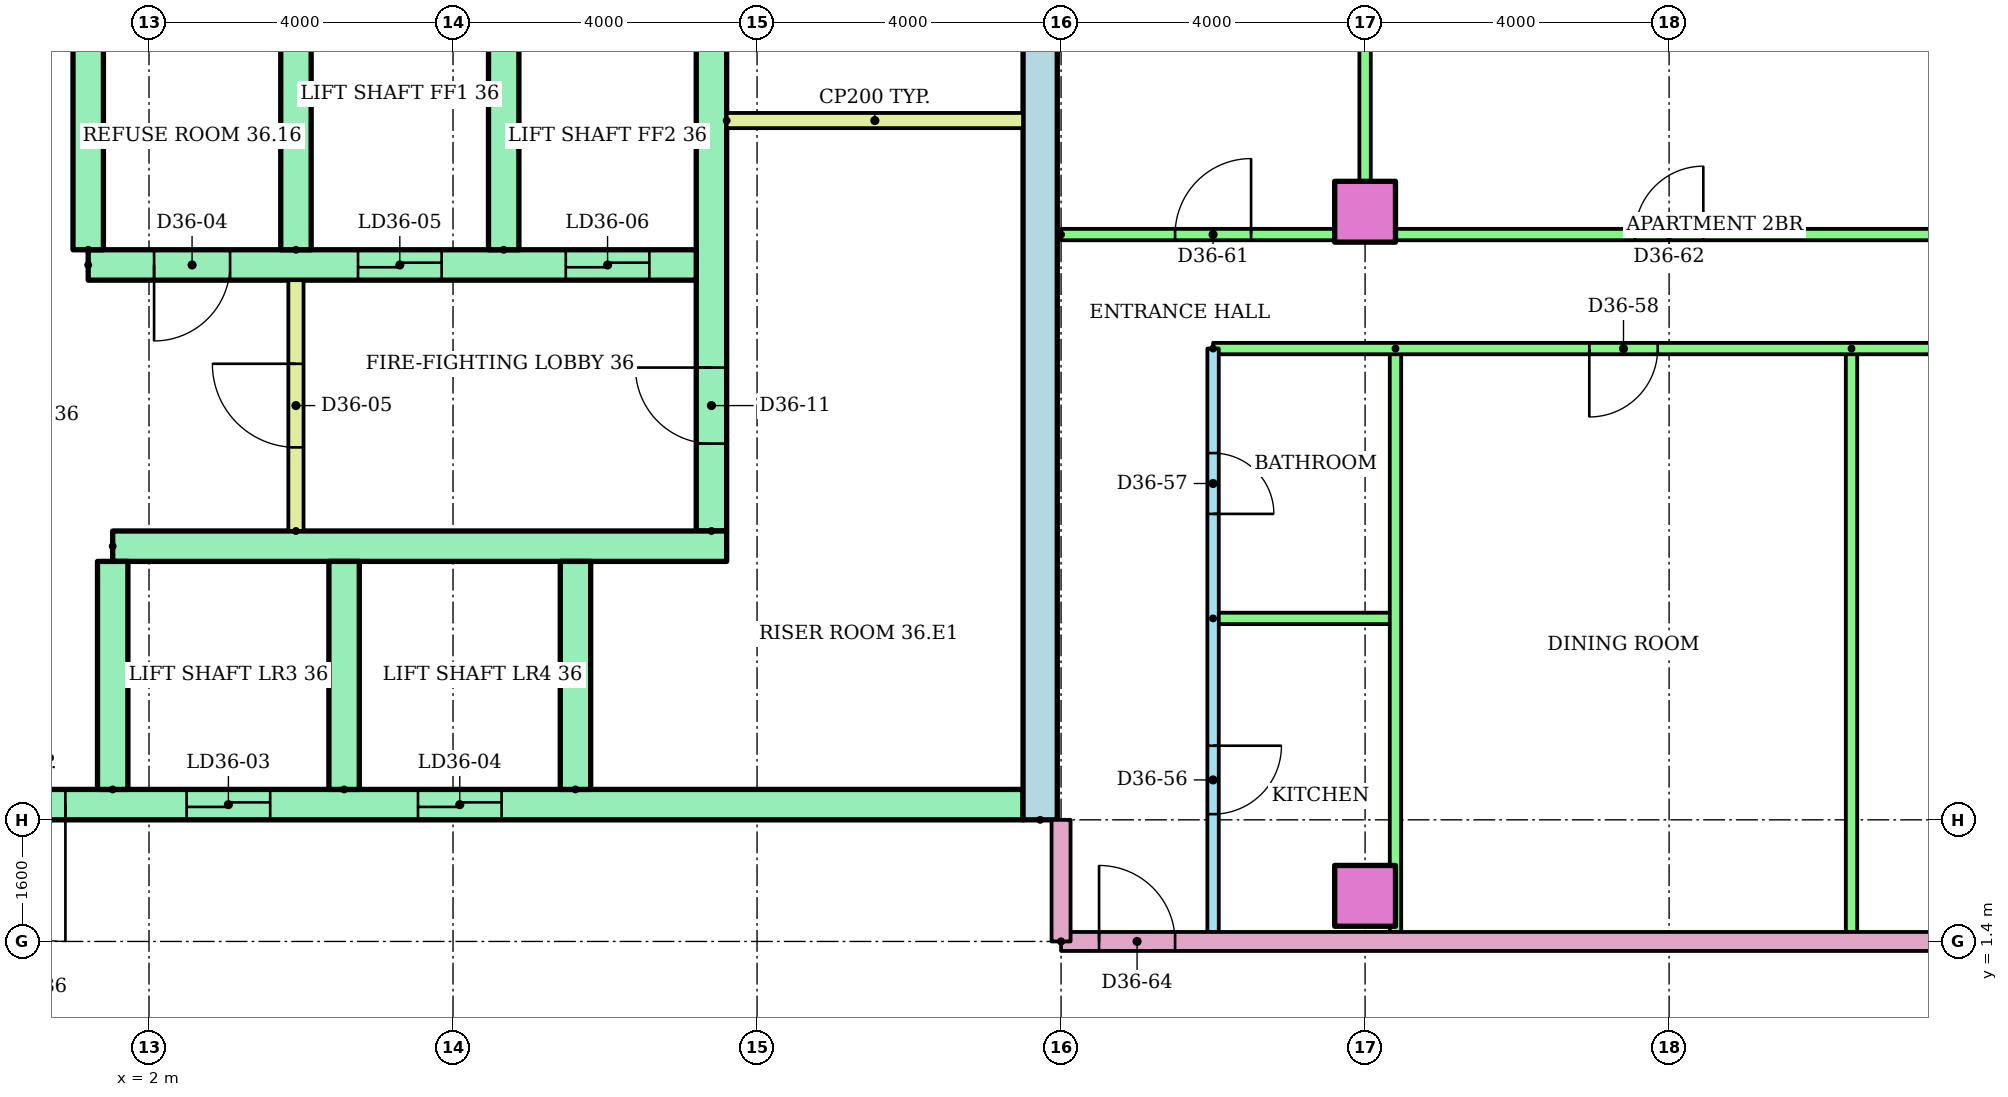
"""IFC4 building model, lengths in metres.
Left out: names, types, materials, properties, quantities, classifications, styles, units other than length and angle.
Written with IfcOpenShell. Run it as: python <this file> out.ifc"""

import sys

from ifc_helpers import new_model, si_unit, direction, frame, frame_2d, origin, origin_2d, place, context, subcontext, project, spatial, rectangle, extrude, element, fill, save


model = new_model("IFC4")
c1 = context("Model", 3, precision=1e-05, world=origin(), true_north=direction((0.0, 1.0)))
c2 = subcontext(c1, "Body", "Model", "MODEL_VIEW")
j1 = project(units=[si_unit("LENGTHUNIT", "METRE"), si_unit("PLANEANGLEUNIT", "RADIAN")], contexts=[c1])
p1 = place(None, origin())
s1 = spatial("IfcSite", under=j1, at=p1, CompositionType="ELEMENT")
p2 = place(p1, origin())
s2 = spatial("IfcBuilding", under=s1, at=p2, CompositionType="ELEMENT")
p3 = place(p2, frame((0.0, 0.0, 139.0)))
s3 = spatial("IfcBuildingStorey", under=s2, at=p3, CompositionType="ELEMENT", Elevation=139.0)
for number, where in (
    (1, (18.0, 2.0, 0.0)),
    (2, (18.0, 11.0, 0.0)),
):
    element("IfcColumn", number, at=place(p3, frame(where)), inside=s3, PredefinedType="COLUMN", context=c2, shape_type="SweptSolid", body=[
        extrude(rectangle(XDim=0.8, YDim=0.8, at=origin_2d()), origin(), (0.0, 0.0, 1.0), 3.2),
    ])
p4 = place(p3, frame((13.725, 3.0, 0.0), z_axis=(0.0, 0.0, 1.0), x_axis=(0.0, 1.0, 0.0)))
e3 = element("IfcWall", 3, at=p4, inside=s3, PredefinedType="SHEAR", context=c2, shape_type="SweptSolid", body=[
    extrude(rectangle(XDim=17.0, YDim=0.45, at=frame_2d((8.5, 0.0))), origin(), (0.0, 0.0, 1.0), 2.92),
])
p5 = place(p3, frame((9.4, 6.8, 0.0), z_axis=(0.0, 0.0, 1.0), x_axis=(0.0, 1.0, 0.0)))
e4 = element("IfcWall", 4, at=p5, inside=s3, PredefinedType="SHEAR", context=c2, shape_type="SweptSolid", body=[
    extrude(rectangle(XDim=12.7, YDim=0.4, at=frame_2d((6.35, 0.0))), origin(), (0.0, 0.0, 1.0), 2.92),
])
p6 = place(p5, frame((1.15, 0.0, 0.0)))
e5 = element("IfcOpeningElement", 5, at=p6, cuts=e4, PredefinedType="OPENING", context=c2, shape_type="SweptSolid", body=[
    extrude(rectangle(XDim=1.0, YDim=2.1, at=frame_2d((0.5, 1.05))), frame((0.0, 0.21, 0.0), z_axis=(0.0, -1.0, 0.0), x_axis=(1.0, 0.0, 0.0)), (0.0, 0.0, 1.0), 0.42),
])
p7 = place(p5, frame((7.925, 0.0, 0.0)))
e6 = element("IfcOpeningElement", 6, at=p7, cuts=e4, PredefinedType="OPENING", context=c2, shape_type="SweptSolid", body=[
    extrude(rectangle(XDim=1.0, YDim=2.1, at=frame_2d((0.5, 1.05))), frame((0.0, 0.21, 0.0), z_axis=(0.0, -1.0, 0.0), x_axis=(1.0, 0.0, 0.0)), (0.0, 0.0, 1.0), 0.42),
])
p8 = place(p3, frame((-13.5, 3.2, 0.0)))
e7 = element("IfcWall", 7, at=p8, inside=s3, PredefinedType="SHEAR", context=c2, shape_type="SweptSolid", body=[
    extrude(rectangle(XDim=27.0, YDim=0.4, at=frame_2d((13.5, 0.0))), origin(), (0.0, 0.0, 1.0), 2.92),
])
p9 = place(p8, frame((6.861, 0.0, 0.0)))
e8 = element("IfcOpeningElement", 8, at=p9, cuts=e7, PredefinedType="OPENING", context=c2, shape_type="SweptSolid", body=[
    extrude(rectangle(XDim=1.1, YDim=2.1, at=frame_2d((0.55, 1.05))), frame((0.0, 0.21, 0.0), z_axis=(0.0, -1.0, 0.0), x_axis=(1.0, 0.0, 0.0)), (0.0, 0.0, 1.0), 0.42),
])
p10 = place(p8, frame((9.906, 0.0, 0.0)))
e9 = element("IfcOpeningElement", 9, at=p10, cuts=e7, PredefinedType="OPENING", context=c2, shape_type="SweptSolid", body=[
    extrude(rectangle(XDim=1.1, YDim=2.1, at=frame_2d((0.55, 1.05))), frame((0.0, 0.21, 0.0), z_axis=(0.0, -1.0, 0.0), x_axis=(1.0, 0.0, 0.0)), (0.0, 0.0, 1.0), 0.42),
])
p11 = place(p8, frame((15.994, 0.0, 0.0)))
e10 = element("IfcOpeningElement", 10, at=p11, cuts=e7, PredefinedType="OPENING", context=c2, shape_type="SweptSolid", body=[
    extrude(rectangle(XDim=1.1, YDim=2.1, at=frame_2d((0.55, 1.05))), frame((0.0, 0.21, 0.0), z_axis=(0.0, -1.0, 0.0), x_axis=(1.0, 0.0, 0.0)), (0.0, 0.0, 1.0), 0.42),
])
p12 = place(p8, frame((19.039, 0.0, 0.0)))
e11 = element("IfcOpeningElement", 11, at=p12, cuts=e7, PredefinedType="OPENING", context=c2, shape_type="SweptSolid", body=[
    extrude(rectangle(XDim=1.1, YDim=2.1, at=frame_2d((0.55, 1.05))), frame((0.0, 0.21, 0.0), z_axis=(0.0, -1.0, 0.0), x_axis=(1.0, 0.0, 0.0)), (0.0, 0.0, 1.0), 0.42),
])
p13 = place(p8, frame((12.6, 0.0, 0.0)))
e12 = element("IfcOpeningElement", 12, at=p13, cuts=e7, PredefinedType="OPENING", context=c2, shape_type="SweptSolid", body=[
    extrude(rectangle(XDim=1.8, YDim=2.1, at=frame_2d((0.9, 1.05))), frame((0.0, 0.21, 0.0), z_axis=(0.0, -1.0, 0.0), x_axis=(1.0, 0.0, 0.0)), (0.0, 0.0, 1.0), 0.42),
])
p14 = place(p3, frame((1.522, 6.6, 0.0)))
e13 = element("IfcWall", 13, at=p14, inside=s3, PredefinedType="SHEAR", context=c2, shape_type="SweptSolid", body=[
    extrude(rectangle(XDim=8.078, YDim=0.4, at=frame_2d((4.039, 0.0))), origin(), (0.0, 0.0, 1.0), 2.92),
])
for number, where, z_axis, x_axis in (
    (14, (1.522, 3.4, 0.0), (0.0, 0.0, 1.0), (0.0, 1.0, 0.0)),
    (15, (4.567, 3.4, 0.0), (0.0, 0.0, 1.0), (0.0, 1.0, 0.0)),
    (16, (7.611, 3.4, 0.0), (0.0, 0.0, 1.0), (0.0, 1.0, 0.0)),
):
    element("IfcWall", number, at=place(p3, frame(where, z_axis=z_axis, x_axis=x_axis)), inside=s3, PredefinedType="SHEAR", context=c2, shape_type="SweptSolid", body=[
        extrude(rectangle(XDim=3.0, YDim=0.4, at=frame_2d((1.5, 0.0))), origin(), (0.0, 0.0, 1.0), 2.92),
    ])
p15 = place(p3, frame((1.2, 10.3, 0.0)))
e17 = element("IfcWall", 17, at=p15, inside=s3, PredefinedType="SHEAR", context=c2, shape_type="SweptSolid", body=[
    extrude(rectangle(XDim=8.0, YDim=0.4, at=frame_2d((4.0, 0.0))), origin(), (0.0, 0.0, 1.0), 2.92),
])
p16 = place(p15, frame((3.55, 0.0, 0.0)))
e18 = element("IfcOpeningElement", 18, at=p16, cuts=e17, PredefinedType="OPENING", context=c2, shape_type="SweptSolid", body=[
    extrude(rectangle(XDim=1.1, YDim=2.1, at=frame_2d((0.55, 1.05))), frame((0.0, 0.21, 0.0), z_axis=(0.0, -1.0, 0.0), x_axis=(1.0, 0.0, 0.0)), (0.0, 0.0, 1.0), 0.42),
])
p17 = place(p15, frame((6.283, 0.0, 0.0)))
e19 = element("IfcOpeningElement", 19, at=p17, cuts=e17, PredefinedType="OPENING", context=c2, shape_type="SweptSolid", body=[
    extrude(rectangle(XDim=1.1, YDim=2.1, at=frame_2d((0.55, 1.05))), frame((0.0, 0.21, 0.0), z_axis=(0.0, -1.0, 0.0), x_axis=(1.0, 0.0, 0.0)), (0.0, 0.0, 1.0), 0.42),
])
p18 = place(p15, frame((0.867, 0.0, 0.0)))
e20 = element("IfcOpeningElement", 20, at=p18, cuts=e17, PredefinedType="OPENING", context=c2, shape_type="SweptSolid", body=[
    extrude(rectangle(XDim=1.0, YDim=2.1, at=frame_2d((0.5, 1.05))), frame((0.0, 0.21, 0.0), z_axis=(0.0, -1.0, 0.0), x_axis=(1.0, 0.0, 0.0)), (0.0, 0.0, 1.0), 0.42),
])
for number, where, z_axis, x_axis in (
    (21, (1.2, 10.5, 0.0), (0.0, 0.0, 1.0), (0.0, 1.0, 0.0)),
    (22, (3.933, 10.5, 0.0), (0.0, 0.0, 1.0), (0.0, 1.0, 0.0)),
    (23, (6.667, 10.5, 0.0), (0.0, 0.0, 1.0), (0.0, 1.0, 0.0)),
):
    element("IfcWall", number, at=place(p3, frame(where, z_axis=z_axis, x_axis=x_axis)), inside=s3, PredefinedType="SHEAR", context=c2, shape_type="SweptSolid", body=[
        extrude(rectangle(XDim=3.0, YDim=0.4, at=frame_2d((1.5, 0.0))), origin(), (0.0, 0.0, 1.0), 2.92),
    ])
p19 = place(p3, frame((3.933, 6.8, 0.0), z_axis=(0.0, 0.0, 1.0), x_axis=(0.0, 1.0, 0.0)))
e24 = element("IfcWall", 24, at=p19, inside=s3, PredefinedType="PARTITIONING", context=c2, shape_type="SweptSolid", body=[
    extrude(rectangle(XDim=3.3, YDim=0.2, at=frame_2d((1.65, 0.0))), origin(), (0.0, 0.0, 1.0), 2.92),
])
p20 = place(p19, frame((1.1, 0.0, 0.0)))
e25 = element("IfcOpeningElement", 25, at=p20, cuts=e24, PredefinedType="OPENING", context=c2, shape_type="SweptSolid", body=[
    extrude(rectangle(XDim=1.1, YDim=2.1, at=frame_2d((0.55, 1.05))), frame((0.0, 0.11, 0.0), z_axis=(0.0, -1.0, 0.0), x_axis=(1.0, 0.0, 0.0)), (0.0, 0.0, 1.0), 0.22),
])
p21 = place(p3, frame((9.6, 12.2, 0.0)))
e26 = element("IfcWall", 26, at=p21, inside=s3, PredefinedType="PARTITIONING", context=c2, shape_type="SweptSolid", body=[
    extrude(rectangle(XDim=3.9, YDim=0.2, at=frame_2d((1.95, 0.0))), origin(), (0.0, 0.0, 1.0), 2.92),
])
p22 = place(p3, frame((16.0, 9.2, 0.0), z_axis=(0.0, 0.0, 1.0), x_axis=(0.0, -1.0, 0.0)))
e27 = element("IfcWall", 27, at=p22, inside=s3, PredefinedType="PARTITIONING", context=c2, shape_type="SweptSolid", body=[
    extrude(rectangle(XDim=7.8, YDim=0.15, at=frame_2d((3.9, 0.0))), origin(), (0.0, 0.0, 1.0), 2.4),
])
p23 = place(p22, frame((5.225, 0.0, 0.0)))
e28 = element("IfcOpeningElement", 28, at=p23, cuts=e27, PredefinedType="OPENING", context=c2, shape_type="SweptSolid", body=[
    extrude(rectangle(XDim=0.9, YDim=2.1, at=frame_2d((0.45, 1.05))), frame((0.0, 0.085, 0.0), z_axis=(0.0, -1.0, 0.0), x_axis=(1.0, 0.0, 0.0)), (0.0, 0.0, 1.0), 0.17),
])
p24 = place(p22, frame((1.375, 0.0, 0.0)))
e29 = element("IfcOpeningElement", 29, at=p24, cuts=e27, PredefinedType="OPENING", context=c2, shape_type="SweptSolid", body=[
    extrude(rectangle(XDim=0.8, YDim=2.1, at=frame_2d((0.4, 1.05))), frame((0.0, 0.085, 0.0), z_axis=(0.0, -1.0, 0.0), x_axis=(1.0, 0.0, 0.0)), (0.0, 0.0, 1.0), 0.17),
])
p25 = place(p3, frame((16.0, 5.65, 0.0)))
e30 = element("IfcWall", 30, at=p25, inside=s3, PredefinedType="PARTITIONING", context=c2, shape_type="SweptSolid", body=[
    extrude(rectangle(XDim=2.4, YDim=0.15, at=frame_2d((1.2, 0.0))), origin(), (0.0, 0.0, 1.0), 2.4),
])
for number, where, z_axis, x_axis in (
    (31, (18.4, 9.2, 0.0), (0.0, 0.0, 1.0), (0.0, -1.0, 0.0)),
    (32, (24.4, 9.2, 0.0), (0.0, 0.0, 1.0), (0.0, -1.0, 0.0)),
):
    element("IfcWall", number, at=place(p3, frame(where, z_axis=z_axis, x_axis=x_axis)), inside=s3, PredefinedType="PARTITIONING", context=c2, shape_type="SweptSolid", body=[
        extrude(rectangle(XDim=7.8, YDim=0.15, at=frame_2d((3.9, 0.0))), origin(), (0.0, 0.0, 1.0), 2.4),
    ])
p26 = place(p3, frame((32.71, 9.2, 0.0), z_axis=(0.0, 0.0, 1.0), x_axis=(-1.0, 0.0, 0.0)))
e33 = element("IfcWall", 33, at=p26, inside=s3, PredefinedType="PARTITIONING", context=c2, shape_type="SweptSolid", body=[
    extrude(rectangle(XDim=16.71, YDim=0.15, at=frame_2d((8.355, 0.0))), origin(), (0.0, 0.0, 1.0), 2.4),
])
p27 = place(p26, frame((10.86, 0.0, 0.0)))
e34 = element("IfcOpeningElement", 34, at=p27, cuts=e33, PredefinedType="OPENING", context=c2, shape_type="SweptSolid", body=[
    extrude(rectangle(XDim=0.9, YDim=2.1, at=frame_2d((0.45, 1.05))), frame((0.0, 0.085, 0.0), z_axis=(0.0, -1.0, 0.0), x_axis=(1.0, 0.0, 0.0)), (0.0, 0.0, 1.0), 0.17),
])
p28 = place(p26, frame((5.192, 0.0, 0.0)))
e35 = element("IfcOpeningElement", 35, at=p28, cuts=e33, PredefinedType="OPENING", context=c2, shape_type="SweptSolid", body=[
    extrude(rectangle(XDim=0.9, YDim=2.1, at=frame_2d((0.45, 1.05))), frame((0.0, 0.085, 0.0), z_axis=(0.0, -1.0, 0.0), x_axis=(1.0, 0.0, 0.0)), (0.0, 0.0, 1.0), 0.17),
])
p29 = place(p26, frame((1.435, 0.0, 0.0)))
e36 = element("IfcOpeningElement", 36, at=p29, cuts=e33, PredefinedType="OPENING", context=c2, shape_type="SweptSolid", body=[
    extrude(rectangle(XDim=0.9, YDim=2.1, at=frame_2d((0.45, 1.05))), frame((0.0, 0.085, 0.0), z_axis=(0.0, -1.0, 0.0), x_axis=(1.0, 0.0, 0.0)), (0.0, 0.0, 1.0), 0.17),
])
p30 = place(p3, frame((14.0, 10.7, 0.0)))
e37 = element("IfcWall", 37, at=p30, inside=s3, PredefinedType="PARTITIONING", context=c2, shape_type="SweptSolid", body=[
    extrude(rectangle(XDim=18.71, YDim=0.15, at=frame_2d((9.355, 0.0))), origin(), (0.0, 0.0, 1.0), 2.4),
])
p31 = place(p30, frame((1.5, 0.0, 0.0)))
e38 = element("IfcOpeningElement", 38, at=p31, cuts=e37, PredefinedType="OPENING", context=c2, shape_type="SweptSolid", body=[
    extrude(rectangle(XDim=1.0, YDim=2.1, at=frame_2d((0.5, 1.05))), frame((0.0, 0.085, 0.0), z_axis=(0.0, -1.0, 0.0), x_axis=(1.0, 0.0, 0.0)), (0.0, 0.0, 1.0), 0.17),
])
p32 = place(p30, frame((7.55, 0.0, 0.0)))
e39 = element("IfcOpeningElement", 39, at=p32, cuts=e37, PredefinedType="OPENING", context=c2, shape_type="SweptSolid", body=[
    extrude(rectangle(XDim=0.9, YDim=2.1, at=frame_2d((0.45, 1.05))), frame((0.0, 0.085, 0.0), z_axis=(0.0, -1.0, 0.0), x_axis=(1.0, 0.0, 0.0)), (0.0, 0.0, 1.0), 0.17),
])
p33 = place(p30, frame((14.8, 0.0, 0.0)))
e40 = element("IfcOpeningElement", 40, at=p33, cuts=e37, PredefinedType="OPENING", context=c2, shape_type="SweptSolid", body=[
    extrude(rectangle(XDim=0.9, YDim=2.1, at=frame_2d((0.45, 1.05))), frame((0.0, 0.085, 0.0), z_axis=(0.0, -1.0, 0.0), x_axis=(1.0, 0.0, 0.0)), (0.0, 0.0, 1.0), 0.17),
])
p34 = place(p3, frame((18.0, 18.721, 0.0), z_axis=(0.0, 0.0, 1.0), x_axis=(0.0, -1.0, 0.0)))
e41 = element("IfcWall", 41, at=p34, inside=s3, PredefinedType="PARTITIONING", context=c2, shape_type="SweptSolid", body=[
    extrude(rectangle(XDim=8.021, YDim=0.15, at=frame_2d((4.01, 0.0))), origin(), (0.0, 0.0, 1.0), 2.4),
])
p35 = place(p3, frame((14.0, 1.4, 0.0)))
e42 = element("IfcWall", 42, at=p35, inside=s3, PredefinedType="PARTITIONING", context=c2, shape_type="SweptSolid", body=[
    extrude(rectangle(XDim=15.0, YDim=0.25, at=frame_2d((7.5, 0.0))), origin(), (0.0, 0.0, 1.0), 2.4),
])
p36 = place(p35, frame((0.5, 0.0, 0.0)))
e43 = element("IfcOpeningElement", 43, at=p36, cuts=e42, PredefinedType="OPENING", context=c2, shape_type="SweptSolid", body=[
    extrude(rectangle(XDim=1.0, YDim=2.1, at=frame_2d((0.5, 1.05))), frame((0.0, 0.135, 0.0), z_axis=(0.0, -1.0, 0.0), x_axis=(1.0, 0.0, 0.0)), (0.0, 0.0, 1.0), 0.27),
])
p37 = place(p3, frame((14.0, 1.4, 0.0), z_axis=(0.0, 0.0, 1.0), x_axis=(0.0, 1.0, 0.0)))
e44 = element("IfcWall", 44, at=p37, inside=s3, PredefinedType="PARTITIONING", context=c2, shape_type="SweptSolid", body=[
    extrude(rectangle(XDim=1.6, YDim=0.25, at=frame_2d((0.8, 0.0))), origin(), (0.0, 0.0, 1.0), 2.4),
])
p38 = place(p11, origin())
e45 = element("IfcDoor", 45, at=p38, inside=s3, OperationType="SLIDING_TO_LEFT", PredefinedType="DOOR", context=c2, shape_type="SweptSolid", body=[
    extrude(rectangle(XDim=1.1, YDim=2.1, at=frame_2d((0.55, 1.05))), frame((0.0, 0.025, 0.0), z_axis=(0.0, -1.0, 0.0), x_axis=(1.0, 0.0, 0.0)), (0.0, 0.0, 1.0), 0.05),
])
fill(e10, e45)
p39 = place(p12, origin())
e46 = element("IfcDoor", 46, at=p39, inside=s3, OperationType="SLIDING_TO_LEFT", PredefinedType="DOOR", context=c2, shape_type="SweptSolid", body=[
    extrude(rectangle(XDim=1.1, YDim=2.1, at=frame_2d((0.55, 1.05))), frame((0.0, 0.025, 0.0), z_axis=(0.0, -1.0, 0.0), x_axis=(1.0, 0.0, 0.0)), (0.0, 0.0, 1.0), 0.05),
])
fill(e11, e46)
p40 = place(p13, frame((1.8, 0.0, 0.0), z_axis=(0.0, 0.0, 1.0), x_axis=(-1.0, 0.0, 0.0)))
e47 = element("IfcDoor", 47, at=p40, inside=s3, OperationType="DOUBLE_DOOR_SINGLE_SWING", PredefinedType="DOOR", context=c2, shape_type="SweptSolid", body=[
    extrude(rectangle(XDim=1.8, YDim=2.1, at=frame_2d((0.9, 1.05))), frame((0.0, 0.025, 0.0), z_axis=(0.0, -1.0, 0.0), x_axis=(1.0, 0.0, 0.0)), (0.0, 0.0, 1.0), 0.05),
])
fill(e12, e47)
p41 = place(p16, origin())
e48 = element("IfcDoor", 48, at=p41, inside=s3, OperationType="SLIDING_TO_LEFT", PredefinedType="DOOR", context=c2, shape_type="SweptSolid", body=[
    extrude(rectangle(XDim=1.1, YDim=2.1, at=frame_2d((0.55, 1.05))), frame((0.0, 0.025, 0.0), z_axis=(0.0, -1.0, 0.0), x_axis=(1.0, 0.0, 0.0)), (0.0, 0.0, 1.0), 0.05),
])
fill(e18, e48)
p42 = place(p17, origin())
e49 = element("IfcDoor", 49, at=p42, inside=s3, OperationType="SLIDING_TO_LEFT", PredefinedType="DOOR", context=c2, shape_type="SweptSolid", body=[
    extrude(rectangle(XDim=1.1, YDim=2.1, at=frame_2d((0.55, 1.05))), frame((0.0, 0.025, 0.0), z_axis=(0.0, -1.0, 0.0), x_axis=(1.0, 0.0, 0.0)), (0.0, 0.0, 1.0), 0.05),
])
fill(e19, e49)
p43 = place(p18, frame((1.0, 0.0, 0.0), z_axis=(0.0, 0.0, 1.0), x_axis=(-1.0, 0.0, 0.0)))
e50 = element("IfcDoor", 50, at=p43, inside=s3, OperationType="SINGLE_SWING_LEFT", PredefinedType="DOOR", context=c2, shape_type="SweptSolid", body=[
    extrude(rectangle(XDim=1.0, YDim=2.1, at=frame_2d((0.5, 1.05))), frame((0.0, 0.025, 0.0), z_axis=(0.0, -1.0, 0.0), x_axis=(1.0, 0.0, 0.0)), (0.0, 0.0, 1.0), 0.05),
])
fill(e20, e50)
p44 = place(p20, origin())
e51 = element("IfcDoor", 51, at=p44, inside=s3, OperationType="SINGLE_SWING_RIGHT", PredefinedType="DOOR", context=c2, shape_type="SweptSolid", body=[
    extrude(rectangle(XDim=1.1, YDim=2.1, at=frame_2d((0.55, 1.05))), frame((0.0, 0.025, 0.0), z_axis=(0.0, -1.0, 0.0), x_axis=(1.0, 0.0, 0.0)), (0.0, 0.0, 1.0), 0.05),
])
fill(e25, e51)
p45 = place(p6, origin())
e52 = element("IfcDoor", 52, at=p45, inside=s3, OperationType="SINGLE_SWING_RIGHT", PredefinedType="DOOR", context=c2, shape_type="SweptSolid", body=[
    extrude(rectangle(XDim=1.0, YDim=2.1, at=frame_2d((0.5, 1.05))), frame((0.0, 0.025, 0.0), z_axis=(0.0, -1.0, 0.0), x_axis=(1.0, 0.0, 0.0)), (0.0, 0.0, 1.0), 0.05),
])
fill(e5, e52)
p46 = place(p23, origin())
e53 = element("IfcDoor", 53, at=p46, inside=s3, OperationType="SINGLE_SWING_LEFT", PredefinedType="DOOR", context=c2, shape_type="SweptSolid", body=[
    extrude(rectangle(XDim=0.9, YDim=2.1, at=frame_2d((0.45, 1.05))), frame((0.0, 0.025, 0.0), z_axis=(0.0, -1.0, 0.0), x_axis=(1.0, 0.0, 0.0)), (0.0, 0.0, 1.0), 0.05),
])
fill(e28, e53)
p47 = place(p24, origin())
e54 = element("IfcDoor", 54, at=p47, inside=s3, OperationType="SINGLE_SWING_RIGHT", PredefinedType="DOOR", context=c2, shape_type="SweptSolid", body=[
    extrude(rectangle(XDim=0.8, YDim=2.1, at=frame_2d((0.4, 1.05))), frame((0.0, 0.025, 0.0), z_axis=(0.0, -1.0, 0.0), x_axis=(1.0, 0.0, 0.0)), (0.0, 0.0, 1.0), 0.05),
])
fill(e29, e54)
p48 = place(p27, origin())
e55 = element("IfcDoor", 55, at=p48, inside=s3, OperationType="SINGLE_SWING_RIGHT", PredefinedType="DOOR", context=c2, shape_type="SweptSolid", body=[
    extrude(rectangle(XDim=0.9, YDim=2.1, at=frame_2d((0.45, 1.05))), frame((0.0, 0.025, 0.0), z_axis=(0.0, -1.0, 0.0), x_axis=(1.0, 0.0, 0.0)), (0.0, 0.0, 1.0), 0.05),
])
fill(e34, e55)
p49 = place(p31, origin())
e56 = element("IfcDoor", 56, at=p49, inside=s3, OperationType="SINGLE_SWING_RIGHT", PredefinedType="DOOR", context=c2, shape_type="SweptSolid", body=[
    extrude(rectangle(XDim=1.0, YDim=2.1, at=frame_2d((0.5, 1.05))), frame((0.0, 0.025, 0.0), z_axis=(0.0, -1.0, 0.0), x_axis=(1.0, 0.0, 0.0)), (0.0, 0.0, 1.0), 0.05),
])
fill(e38, e56)
p50 = place(p32, origin())
e57 = element("IfcDoor", 57, at=p50, inside=s3, OperationType="SINGLE_SWING_RIGHT", PredefinedType="DOOR", context=c2, shape_type="SweptSolid", body=[
    extrude(rectangle(XDim=0.9, YDim=2.1, at=frame_2d((0.45, 1.05))), frame((0.0, 0.025, 0.0), z_axis=(0.0, -1.0, 0.0), x_axis=(1.0, 0.0, 0.0)), (0.0, 0.0, 1.0), 0.05),
])
fill(e39, e57)
p51 = place(p36, origin())
e58 = element("IfcDoor", 58, at=p51, inside=s3, OperationType="SINGLE_SWING_LEFT", PredefinedType="DOOR", context=c2, shape_type="SweptSolid", body=[
    extrude(rectangle(XDim=1.0, YDim=2.1, at=frame_2d((0.5, 1.05))), frame((0.0, 0.025, 0.0), z_axis=(0.0, -1.0, 0.0), x_axis=(1.0, 0.0, 0.0)), (0.0, 0.0, 1.0), 0.05),
])
fill(e43, e58)
save(model, sys.argv[1])
